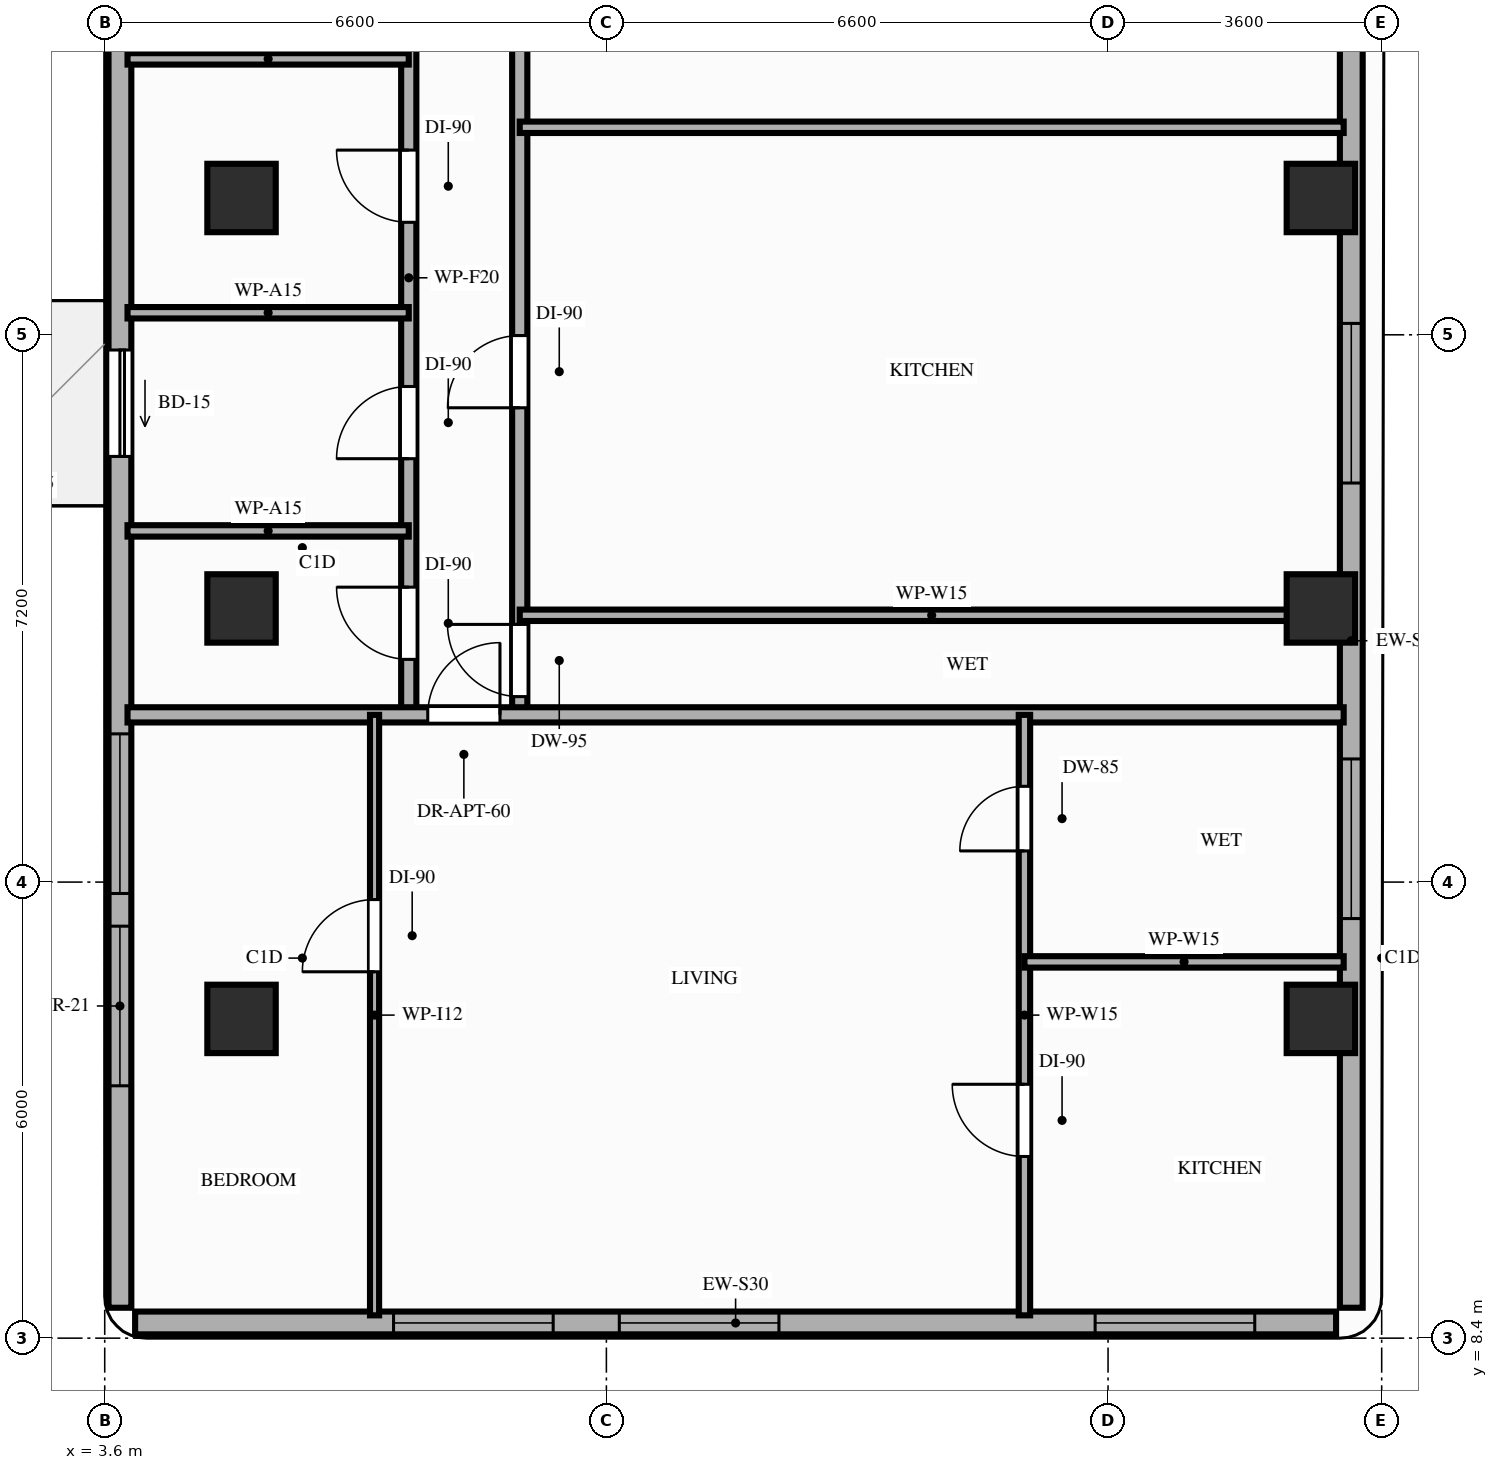
"""IFC4 building model, lengths in metres.
Left out: names, types, materials, properties, quantities, classifications, styles, units other than length and angle.
Written with IfcOpenShell. Run it as: python <this file> out.ifc"""

import sys

from ifc_helpers import new_model, si_unit, direction, frame, frame_2d, origin, origin_2d, place, context, subcontext, project, spatial, rectangle, extrude, element, fill, save


model = new_model("IFC4")
c1 = context("Model", 3, precision=1e-05, world=origin(), true_north=direction((0.0, 1.0)))
c2 = subcontext(c1, "Body", "Model", "MODEL_VIEW")
j1 = project(units=[si_unit("LENGTHUNIT", "METRE"), si_unit("PLANEANGLEUNIT", "RADIAN")], contexts=[c1])
p1 = place(None, origin())
s1 = spatial("IfcSite", under=j1, at=p1, CompositionType="ELEMENT")
p2 = place(p1, origin())
s2 = spatial("IfcBuilding", under=s1, at=p2, CompositionType="ELEMENT")
p3 = place(p2, frame((0.0, 0.0, 179.2)))
s3 = spatial("IfcBuildingStorey", under=s2, at=p3, CompositionType="ELEMENT", Elevation=179.2)
for number, where, z_axis, x_axis in (
    (1, (5.4, 12.6, 0.0), (0.0, 0.0, 1.0), (1.0, 0.0, 0.0)),
    (2, (19.6, 12.6, 0.0), (0.0, 0.0, 1.0), (1.0, 0.0, 0.0)),
    (3, (5.4, 18.0, 0.0), (0.0, 0.0, 1.0), (1.0, 0.0, 0.0)),
    (4, (19.6, 18.0, 0.0), (0.0, 0.0, 1.0), (1.0, 0.0, 0.0)),
    (5, (5.4, 23.4, 0.0), (0.0, 0.0, 1.0), (1.0, 0.0, 0.0)),
    (6, (19.6, 23.4, 0.0), (0.0, 0.0, 1.0), (1.0, 0.0, 0.0)),
):
    element("IfcColumn", number, at=place(p3, frame(where, z_axis=z_axis, x_axis=x_axis)), inside=s3, PredefinedType="COLUMN", context=c2, shape_type="SweptSolid", body=[
        extrude(rectangle(XDim=0.9, YDim=0.9, at=origin_2d()), origin(), (0.0, 0.0, 1.0), 3.2),
    ])
p4 = place(p3, frame((4.0, 8.6, 0.0), z_axis=(0.0, 0.0, 1.0), x_axis=(1.0, 0.0, 0.0)))
e7 = element("IfcWall", 7, at=p4, inside=s3, PredefinedType="STANDARD", context=c2, shape_type="SweptSolid", body=[
    extrude(rectangle(XDim=15.8, YDim=0.3, at=frame_2d((7.9, 0.0))), origin(), (0.0, 0.0, 1.0), 3.02),
])
p5 = place(p4, frame((6.37, 0.0, 0.85)))
e8 = element("IfcOpeningElement", 8, at=p5, cuts=e7, PredefinedType="OPENING", context=c2, shape_type="SweptSolid", body=[
    extrude(rectangle(XDim=2.1, YDim=1.8, at=frame_2d((1.05, 0.9))), frame((0.0, 0.16, 0.0), z_axis=(0.0, -1.0, 0.0), x_axis=(1.0, 0.0, 0.0)), (0.0, 0.0, 1.0), 0.32),
])
p6 = place(p4, frame((12.63, 0.0, 0.85)))
e9 = element("IfcOpeningElement", 9, at=p6, cuts=e7, PredefinedType="OPENING", context=c2, shape_type="SweptSolid", body=[
    extrude(rectangle(XDim=2.1, YDim=1.8, at=frame_2d((1.05, 0.9))), frame((0.0, 0.16, 0.0), z_axis=(0.0, -1.0, 0.0), x_axis=(1.0, 0.0, 0.0)), (0.0, 0.0, 1.0), 0.32),
])
p7 = place(p4, frame((3.4, 0.0, 0.85)))
e10 = element("IfcOpeningElement", 10, at=p7, cuts=e7, PredefinedType="OPENING", context=c2, shape_type="SweptSolid", body=[
    extrude(rectangle(XDim=2.1, YDim=1.8, at=frame_2d((1.05, 0.9))), frame((0.0, 0.16, 0.0), z_axis=(0.0, -1.0, 0.0), x_axis=(1.0, 0.0, 0.0)), (0.0, 0.0, 1.0), 0.32),
])
p8 = place(p3, frame((3.8, 42.1, 0.0), z_axis=(0.0, 0.0, 1.0), x_axis=(0.0, -1.0, 0.0)))
e11 = element("IfcWall", 11, at=p8, inside=s3, PredefinedType="STANDARD", context=c2, shape_type="SweptSolid", body=[
    extrude(rectangle(XDim=33.3, YDim=0.3, at=frame_2d((16.65, 0.0))), origin(), (0.0, 0.0, 1.0), 2.71),
])
p9 = place(p8, frame((20.7, 0.0, 0.0)))
e12 = element("IfcOpeningElement", 12, at=p9, cuts=e11, PredefinedType="OPENING", context=c2, shape_type="SweptSolid", body=[
    extrude(rectangle(XDim=1.4, YDim=2.1, at=frame_2d((0.7, 1.05))), frame((0.0, 0.16, 0.0), z_axis=(0.0, -1.0, 0.0), x_axis=(1.0, 0.0, 0.0)), (0.0, 0.0, 1.0), 0.32),
])
p10 = place(p8, frame((28.28, 0.0, 0.85)))
e13 = element("IfcOpeningElement", 13, at=p10, cuts=e11, PredefinedType="OPENING", context=c2, shape_type="SweptSolid", body=[
    extrude(rectangle(XDim=2.1, YDim=1.61, at=frame_2d((1.05, 0.805))), frame((0.0, 0.16, 0.0), z_axis=(0.0, -1.0, 0.0), x_axis=(1.0, 0.0, 0.0)), (0.0, 0.0, 1.0), 0.32),
])
p11 = place(p8, frame((25.75, 0.0, 0.85)))
e14 = element("IfcOpeningElement", 14, at=p11, cuts=e11, PredefinedType="OPENING", context=c2, shape_type="SweptSolid", body=[
    extrude(rectangle(XDim=2.1, YDim=1.61, at=frame_2d((1.05, 0.805))), frame((0.0, 0.16, 0.0), z_axis=(0.0, -1.0, 0.0), x_axis=(1.0, 0.0, 0.0)), (0.0, 0.0, 1.0), 0.32),
])
p12 = place(p8, frame((14.52, 0.0, 0.85)))
e15 = element("IfcOpeningElement", 15, at=p12, cuts=e11, PredefinedType="OPENING", context=c2, shape_type="SweptSolid", body=[
    extrude(rectangle(XDim=2.1, YDim=1.61, at=frame_2d((1.05, 0.805))), frame((0.0, 0.16, 0.0), z_axis=(0.0, -1.0, 0.0), x_axis=(1.0, 0.0, 0.0)), (0.0, 0.0, 1.0), 0.32),
])
p13 = place(p8, frame((9.75, 0.0, 0.85)))
e16 = element("IfcOpeningElement", 16, at=p13, cuts=e11, PredefinedType="OPENING", context=c2, shape_type="SweptSolid", body=[
    extrude(rectangle(XDim=2.1, YDim=1.61, at=frame_2d((1.05, 0.805))), frame((0.0, 0.16, 0.0), z_axis=(0.0, -1.0, 0.0), x_axis=(1.0, 0.0, 0.0)), (0.0, 0.0, 1.0), 0.32),
])
p14 = place(p8, frame((3.65, 0.0, 0.85)))
e17 = element("IfcOpeningElement", 17, at=p14, cuts=e11, PredefinedType="OPENING", context=c2, shape_type="SweptSolid", body=[
    extrude(rectangle(XDim=2.1, YDim=1.61, at=frame_2d((1.05, 0.805))), frame((0.0, 0.16, 0.0), z_axis=(0.0, -1.0, 0.0), x_axis=(1.0, 0.0, 0.0)), (0.0, 0.0, 1.0), 0.32),
])
p15 = place(p3, frame((20.0, 8.8, 0.0), z_axis=(0.0, 0.0, 1.0), x_axis=(0.0, 1.0, 0.0)))
e18 = element("IfcWall", 18, at=p15, inside=s3, PredefinedType="STANDARD", context=c2, shape_type="SweptSolid", body=[
    extrude(rectangle(XDim=17.55, YDim=0.3, at=frame_2d((8.775, 0.0))), origin(), (0.0, 0.0, 1.0), 2.45),
])
p16 = place(p15, frame((5.12, 0.0, 0.85)))
e19 = element("IfcOpeningElement", 19, at=p16, cuts=e18, PredefinedType="OPENING", context=c2, shape_type="SweptSolid", body=[
    extrude(rectangle(XDim=2.1, YDim=1.35, at=frame_2d((1.05, 0.675))), frame((0.0, 0.16, 0.0), z_axis=(0.0, -1.0, 0.0), x_axis=(1.0, 0.0, 0.0)), (0.0, 0.0, 1.0), 0.32),
])
p17 = place(p15, frame((10.85, 0.0, 0.85)))
e20 = element("IfcOpeningElement", 20, at=p17, cuts=e18, PredefinedType="OPENING", context=c2, shape_type="SweptSolid", body=[
    extrude(rectangle(XDim=2.1, YDim=1.35, at=frame_2d((1.05, 0.675))), frame((0.0, 0.16, 0.0), z_axis=(0.0, -1.0, 0.0), x_axis=(1.0, 0.0, 0.0)), (0.0, 0.0, 1.0), 0.32),
])
p18 = place(p3, frame((7.6, 16.6, 0.0), z_axis=(0.0, 0.0, 1.0), x_axis=(0.0, 1.0, 0.0)))
e21 = element("IfcWall", 21, at=p18, inside=s3, PredefinedType="PARTITIONING", context=c2, shape_type="SweptSolid", body=[
    extrude(rectangle(XDim=11.5, YDim=0.2, at=frame_2d((5.75, 0.0))), origin(), (0.0, 0.0, 1.0), 2.45),
])
p19 = place(p18, frame((0.73, 0.0, 0.0)))
e22 = element("IfcOpeningElement", 22, at=p19, cuts=e21, PredefinedType="OPENING", context=c2, shape_type="SweptSolid", body=[
    extrude(rectangle(XDim=0.95, YDim=2.15, at=frame_2d((0.475, 1.075))), frame((0.0, 0.11, 0.0), z_axis=(0.0, -1.0, 0.0), x_axis=(1.0, 0.0, 0.0)), (0.0, 0.0, 1.0), 0.22),
])
p20 = place(p18, frame((3.37, 0.0, 0.0)))
e23 = element("IfcOpeningElement", 23, at=p20, cuts=e21, PredefinedType="OPENING", context=c2, shape_type="SweptSolid", body=[
    extrude(rectangle(XDim=0.95, YDim=2.15, at=frame_2d((0.475, 1.075))), frame((0.0, 0.11, 0.0), z_axis=(0.0, -1.0, 0.0), x_axis=(1.0, 0.0, 0.0)), (0.0, 0.0, 1.0), 0.22),
])
p21 = place(p18, frame((6.48, 0.0, 0.0)))
e24 = element("IfcOpeningElement", 24, at=p21, cuts=e21, PredefinedType="OPENING", context=c2, shape_type="SweptSolid", body=[
    extrude(rectangle(XDim=0.95, YDim=2.15, at=frame_2d((0.475, 1.075))), frame((0.0, 0.11, 0.0), z_axis=(0.0, -1.0, 0.0), x_axis=(1.0, 0.0, 0.0)), (0.0, 0.0, 1.0), 0.22),
])
p22 = place(p18, frame((9.58, 0.0, 0.0)))
e25 = element("IfcOpeningElement", 25, at=p22, cuts=e21, PredefinedType="OPENING", context=c2, shape_type="SweptSolid", body=[
    extrude(rectangle(XDim=0.95, YDim=2.15, at=frame_2d((0.475, 1.075))), frame((0.0, 0.11, 0.0), z_axis=(0.0, -1.0, 0.0), x_axis=(1.0, 0.0, 0.0)), (0.0, 0.0, 1.0), 0.22),
])
p23 = place(p3, frame((9.06, 16.6, 0.0), z_axis=(0.0, 0.0, 1.0), x_axis=(0.0, 1.0, 0.0)))
e26 = element("IfcWall", 26, at=p23, inside=s3, PredefinedType="PARTITIONING", context=c2, shape_type="SweptSolid", body=[
    extrude(rectangle(XDim=11.5, YDim=0.2, at=frame_2d((5.75, 0.0))), origin(), (0.0, 0.0, 1.0), 2.45),
])
p24 = place(p23, frame((0.24, 0.0, 0.0)))
e27 = element("IfcOpeningElement", 27, at=p24, cuts=e26, PredefinedType="OPENING", context=c2, shape_type="SweptSolid", body=[
    extrude(rectangle(XDim=0.95, YDim=2.1, at=frame_2d((0.475, 1.05))), frame((0.0, 0.11, 0.0), z_axis=(0.0, -1.0, 0.0), x_axis=(1.0, 0.0, 0.0)), (0.0, 0.0, 1.0), 0.22),
])
p25 = place(p23, frame((4.04, 0.0, 0.0)))
e28 = element("IfcOpeningElement", 28, at=p25, cuts=e26, PredefinedType="OPENING", context=c2, shape_type="SweptSolid", body=[
    extrude(rectangle(XDim=0.95, YDim=2.15, at=frame_2d((0.475, 1.075))), frame((0.0, 0.11, 0.0), z_axis=(0.0, -1.0, 0.0), x_axis=(1.0, 0.0, 0.0)), (0.0, 0.0, 1.0), 0.22),
])
p26 = place(p23, frame((9.13, 0.0, 0.0)))
e29 = element("IfcOpeningElement", 29, at=p26, cuts=e26, PredefinedType="OPENING", context=c2, shape_type="SweptSolid", body=[
    extrude(rectangle(XDim=0.95, YDim=2.15, at=frame_2d((0.475, 1.075))), frame((0.0, 0.11, 0.0), z_axis=(0.0, -1.0, 0.0), x_axis=(1.0, 0.0, 0.0)), (0.0, 0.0, 1.0), 0.22),
])
p27 = place(p3, frame((3.9, 16.6, 0.0), z_axis=(0.0, 0.0, 1.0), x_axis=(1.0, 0.0, 0.0)))
e30 = element("IfcWall", 30, at=p27, inside=s3, PredefinedType="PARTITIONING", context=c2, shape_type="SweptSolid", body=[
    extrude(rectangle(XDim=16.0, YDim=0.2, at=frame_2d((8.0, 0.0))), origin(), (0.0, 0.0, 1.0), 2.45),
])
p28 = place(p27, frame((3.95, 0.0, 0.0)))
e31 = element("IfcOpeningElement", 31, at=p28, cuts=e30, PredefinedType="OPENING", context=c2, shape_type="SweptSolid", body=[
    extrude(rectangle(XDim=0.95, YDim=2.15, at=frame_2d((0.475, 1.075))), frame((0.0, 0.11, 0.0), z_axis=(0.0, -1.0, 0.0), x_axis=(1.0, 0.0, 0.0)), (0.0, 0.0, 1.0), 0.22),
])
p29 = place(p3, frame((7.15, 8.7, 0.0), z_axis=(0.0, 0.0, 1.0), x_axis=(0.0, 1.0, 0.0)))
e32 = element("IfcWall", 32, at=p29, inside=s3, PredefinedType="PARTITIONING", context=c2, shape_type="SweptSolid", body=[
    extrude(rectangle(XDim=7.9, YDim=0.12, at=frame_2d((3.95, 0.0))), origin(), (0.0, 0.0, 1.0), 2.45),
])
p30 = place(p29, frame((4.52, 0.0, 0.0)))
e33 = element("IfcOpeningElement", 33, at=p30, cuts=e32, PredefinedType="OPENING", context=c2, shape_type="SweptSolid", body=[
    extrude(rectangle(XDim=0.95, YDim=2.15, at=frame_2d((0.475, 1.075))), frame((0.0, 0.07, 0.0), z_axis=(0.0, -1.0, 0.0), x_axis=(1.0, 0.0, 0.0)), (0.0, 0.0, 1.0), 0.14),
])
p31 = place(p3, frame((15.7, 8.7, 0.0), z_axis=(0.0, 0.0, 1.0), x_axis=(0.0, 1.0, 0.0)))
e34 = element("IfcWall", 34, at=p31, inside=s3, PredefinedType="PARTITIONING", context=c2, shape_type="SweptSolid", body=[
    extrude(rectangle(XDim=7.9, YDim=0.15, at=frame_2d((3.95, 0.0))), origin(), (0.0, 0.0, 1.0), 2.45),
])
p32 = place(p31, frame((2.09, 0.0, 0.0)))
e35 = element("IfcOpeningElement", 35, at=p32, cuts=e34, PredefinedType="OPENING", context=c2, shape_type="SweptSolid", body=[
    extrude(rectangle(XDim=0.95, YDim=2.15, at=frame_2d((0.475, 1.075))), frame((0.0, 0.085, 0.0), z_axis=(0.0, -1.0, 0.0), x_axis=(1.0, 0.0, 0.0)), (0.0, 0.0, 1.0), 0.17),
])
p33 = place(p31, frame((6.11, 0.0, 0.0)))
e36 = element("IfcOpeningElement", 36, at=p33, cuts=e34, PredefinedType="OPENING", context=c2, shape_type="SweptSolid", body=[
    extrude(rectangle(XDim=0.85, YDim=2.1, at=frame_2d((0.425, 1.05))), frame((0.0, 0.085, 0.0), z_axis=(0.0, -1.0, 0.0), x_axis=(1.0, 0.0, 0.0)), (0.0, 0.0, 1.0), 0.17),
])
p34 = place(p3, frame((15.7, 13.35, 0.0), z_axis=(0.0, 0.0, 1.0), x_axis=(1.0, 0.0, 0.0)))
e37 = element("IfcWall", 37, at=p34, inside=s3, PredefinedType="PARTITIONING", context=c2, shape_type="SweptSolid", body=[
    extrude(rectangle(XDim=4.2, YDim=0.15, at=frame_2d((2.1, 0.0))), origin(), (0.0, 0.0, 1.0), 2.45),
])
for number, where, z_axis, x_axis in (
    (38, (3.9, 19.02, 0.0), (0.0, 0.0, 1.0), (1.0, 0.0, 0.0)),
    (39, (3.9, 21.89, 0.0), (0.0, 0.0, 1.0), (1.0, 0.0, 0.0)),
    (40, (3.9, 25.23, 0.0), (0.0, 0.0, 1.0), (1.0, 0.0, 0.0)),
):
    element("IfcWall", number, at=place(p3, frame(where, z_axis=z_axis, x_axis=x_axis)), inside=s3, PredefinedType="PARTITIONING", context=c2, shape_type="SweptSolid", body=[
        extrude(rectangle(XDim=3.7, YDim=0.15, at=frame_2d((1.85, 0.0))), origin(), (0.0, 0.0, 1.0), 2.45),
    ])
for number, where, z_axis, x_axis in (
    (41, (9.06, 17.91, 0.0), (0.0, 0.0, 1.0), (1.0, 0.0, 0.0)),
    (42, (9.06, 24.33, 0.0), (0.0, 0.0, 1.0), (1.0, 0.0, 0.0)),
):
    element("IfcWall", number, at=place(p3, frame(where, z_axis=z_axis, x_axis=x_axis)), inside=s3, PredefinedType="PARTITIONING", context=c2, shape_type="SweptSolid", body=[
        extrude(rectangle(XDim=10.84, YDim=0.15, at=frame_2d((5.42, 0.0))), origin(), (0.0, 0.0, 1.0), 2.45),
    ])
p35 = place(p9, origin())
e43 = element("IfcDoor", 43, at=p35, inside=s3, OperationType="SLIDING_TO_RIGHT", PredefinedType="DOOR", context=c2, shape_type="SweptSolid", body=[
    extrude(rectangle(XDim=1.4, YDim=2.1, at=frame_2d((0.7, 1.05))), frame((0.0, 0.025, 0.0), z_axis=(0.0, -1.0, 0.0), x_axis=(1.0, 0.0, 0.0)), (0.0, 0.0, 1.0), 0.05),
])
fill(e12, e43)
p36 = place(p10, origin())
e44 = element("IfcWindow", 44, at=p36, inside=s3, PartitioningType="SINGLE_PANEL", PredefinedType="WINDOW", context=c2, shape_type="SweptSolid", body=[
    extrude(rectangle(XDim=2.1, YDim=1.61, at=frame_2d((1.05, 0.805))), frame((0.0, 0.03, 0.0), z_axis=(0.0, -1.0, 0.0), x_axis=(1.0, 0.0, 0.0)), (0.0, 0.0, 1.0), 0.06),
])
fill(e13, e44)
p37 = place(p5, origin())
e45 = element("IfcWindow", 45, at=p37, inside=s3, PartitioningType="SINGLE_PANEL", PredefinedType="WINDOW", context=c2, shape_type="SweptSolid", body=[
    extrude(rectangle(XDim=2.1, YDim=1.8, at=frame_2d((1.05, 0.9))), frame((0.0, 0.03, 0.0), z_axis=(0.0, -1.0, 0.0), x_axis=(1.0, 0.0, 0.0)), (0.0, 0.0, 1.0), 0.06),
])
fill(e8, e45)
p38 = place(p6, origin())
e46 = element("IfcWindow", 46, at=p38, inside=s3, PartitioningType="SINGLE_PANEL", PredefinedType="WINDOW", context=c2, shape_type="SweptSolid", body=[
    extrude(rectangle(XDim=2.1, YDim=1.8, at=frame_2d((1.05, 0.9))), frame((0.0, 0.03, 0.0), z_axis=(0.0, -1.0, 0.0), x_axis=(1.0, 0.0, 0.0)), (0.0, 0.0, 1.0), 0.06),
])
fill(e9, e46)
p39 = place(p16, origin())
e47 = element("IfcWindow", 47, at=p39, inside=s3, PartitioningType="SINGLE_PANEL", PredefinedType="WINDOW", context=c2, shape_type="SweptSolid", body=[
    extrude(rectangle(XDim=2.1, YDim=1.35, at=frame_2d((1.05, 0.675))), frame((0.0, 0.03, 0.0), z_axis=(0.0, -1.0, 0.0), x_axis=(1.0, 0.0, 0.0)), (0.0, 0.0, 1.0), 0.06),
])
fill(e19, e47)
p40 = place(p11, origin())
e48 = element("IfcWindow", 48, at=p40, inside=s3, PartitioningType="SINGLE_PANEL", PredefinedType="WINDOW", context=c2, shape_type="SweptSolid", body=[
    extrude(rectangle(XDim=2.1, YDim=1.61, at=frame_2d((1.05, 0.805))), frame((0.0, 0.03, 0.0), z_axis=(0.0, -1.0, 0.0), x_axis=(1.0, 0.0, 0.0)), (0.0, 0.0, 1.0), 0.06),
])
fill(e14, e48)
p41 = place(p17, origin())
e49 = element("IfcWindow", 49, at=p41, inside=s3, PartitioningType="SINGLE_PANEL", PredefinedType="WINDOW", context=c2, shape_type="SweptSolid", body=[
    extrude(rectangle(XDim=2.1, YDim=1.35, at=frame_2d((1.05, 0.675))), frame((0.0, 0.03, 0.0), z_axis=(0.0, -1.0, 0.0), x_axis=(1.0, 0.0, 0.0)), (0.0, 0.0, 1.0), 0.06),
])
fill(e20, e49)
p42 = place(p7, origin())
e50 = element("IfcWindow", 50, at=p42, inside=s3, PartitioningType="SINGLE_PANEL", PredefinedType="WINDOW", context=c2, shape_type="SweptSolid", body=[
    extrude(rectangle(XDim=2.1, YDim=1.8, at=frame_2d((1.05, 0.9))), frame((0.0, 0.03, 0.0), z_axis=(0.0, -1.0, 0.0), x_axis=(1.0, 0.0, 0.0)), (0.0, 0.0, 1.0), 0.06),
])
fill(e10, e50)
p43 = place(p28, origin())
e51 = element("IfcDoor", 51, at=p43, inside=s3, OperationType="SINGLE_SWING_RIGHT", PredefinedType="DOOR", context=c2, shape_type="SweptSolid", body=[
    extrude(rectangle(XDim=0.95, YDim=2.15, at=frame_2d((0.475, 1.075))), frame((0.0, 0.025, 0.0), z_axis=(0.0, -1.0, 0.0), x_axis=(1.0, 0.0, 0.0)), (0.0, 0.0, 1.0), 0.05),
])
fill(e31, e51)
p44 = place(p30, origin())
e52 = element("IfcDoor", 52, at=p44, inside=s3, OperationType="SINGLE_SWING_LEFT", PredefinedType="DOOR", context=c2, shape_type="SweptSolid", body=[
    extrude(rectangle(XDim=0.95, YDim=2.15, at=frame_2d((0.475, 1.075))), frame((0.0, 0.025, 0.0), z_axis=(0.0, -1.0, 0.0), x_axis=(1.0, 0.0, 0.0)), (0.0, 0.0, 1.0), 0.05),
])
fill(e33, e52)
p45 = place(p32, origin())
e53 = element("IfcDoor", 53, at=p45, inside=s3, OperationType="SINGLE_SWING_RIGHT", PredefinedType="DOOR", context=c2, shape_type="SweptSolid", body=[
    extrude(rectangle(XDim=0.95, YDim=2.15, at=frame_2d((0.475, 1.075))), frame((0.0, 0.025, 0.0), z_axis=(0.0, -1.0, 0.0), x_axis=(1.0, 0.0, 0.0)), (0.0, 0.0, 1.0), 0.05),
])
fill(e35, e53)
p46 = place(p33, origin())
e54 = element("IfcDoor", 54, at=p46, inside=s3, OperationType="SINGLE_SWING_LEFT", PredefinedType="DOOR", context=c2, shape_type="SweptSolid", body=[
    extrude(rectangle(XDim=0.85, YDim=2.1, at=frame_2d((0.425, 1.05))), frame((0.0, 0.025, 0.0), z_axis=(0.0, -1.0, 0.0), x_axis=(1.0, 0.0, 0.0)), (0.0, 0.0, 1.0), 0.05),
])
fill(e36, e54)
p47 = place(p19, origin())
e55 = element("IfcDoor", 55, at=p47, inside=s3, OperationType="SINGLE_SWING_RIGHT", PredefinedType="DOOR", context=c2, shape_type="SweptSolid", body=[
    extrude(rectangle(XDim=0.95, YDim=2.15, at=frame_2d((0.475, 1.075))), frame((0.0, 0.025, 0.0), z_axis=(0.0, -1.0, 0.0), x_axis=(1.0, 0.0, 0.0)), (0.0, 0.0, 1.0), 0.05),
])
fill(e22, e55)
p48 = place(p20, origin())
e56 = element("IfcDoor", 56, at=p48, inside=s3, OperationType="SINGLE_SWING_LEFT", PredefinedType="DOOR", context=c2, shape_type="SweptSolid", body=[
    extrude(rectangle(XDim=0.95, YDim=2.15, at=frame_2d((0.475, 1.075))), frame((0.0, 0.025, 0.0), z_axis=(0.0, -1.0, 0.0), x_axis=(1.0, 0.0, 0.0)), (0.0, 0.0, 1.0), 0.05),
])
fill(e23, e56)
p49 = place(p21, origin())
e57 = element("IfcDoor", 57, at=p49, inside=s3, OperationType="SINGLE_SWING_RIGHT", PredefinedType="DOOR", context=c2, shape_type="SweptSolid", body=[
    extrude(rectangle(XDim=0.95, YDim=2.15, at=frame_2d((0.475, 1.075))), frame((0.0, 0.025, 0.0), z_axis=(0.0, -1.0, 0.0), x_axis=(1.0, 0.0, 0.0)), (0.0, 0.0, 1.0), 0.05),
])
fill(e24, e57)
p50 = place(p24, origin())
e58 = element("IfcDoor", 58, at=p50, inside=s3, OperationType="SINGLE_SWING_RIGHT", PredefinedType="DOOR", context=c2, shape_type="SweptSolid", body=[
    extrude(rectangle(XDim=0.95, YDim=2.1, at=frame_2d((0.475, 1.05))), frame((0.0, 0.025, 0.0), z_axis=(0.0, -1.0, 0.0), x_axis=(1.0, 0.0, 0.0)), (0.0, 0.0, 1.0), 0.05),
])
fill(e27, e58)
p51 = place(p25, origin())
e59 = element("IfcDoor", 59, at=p51, inside=s3, OperationType="SINGLE_SWING_LEFT", PredefinedType="DOOR", context=c2, shape_type="SweptSolid", body=[
    extrude(rectangle(XDim=0.95, YDim=2.15, at=frame_2d((0.475, 1.075))), frame((0.0, 0.025, 0.0), z_axis=(0.0, -1.0, 0.0), x_axis=(1.0, 0.0, 0.0)), (0.0, 0.0, 1.0), 0.05),
])
fill(e28, e59)
save(model, sys.argv[1])
